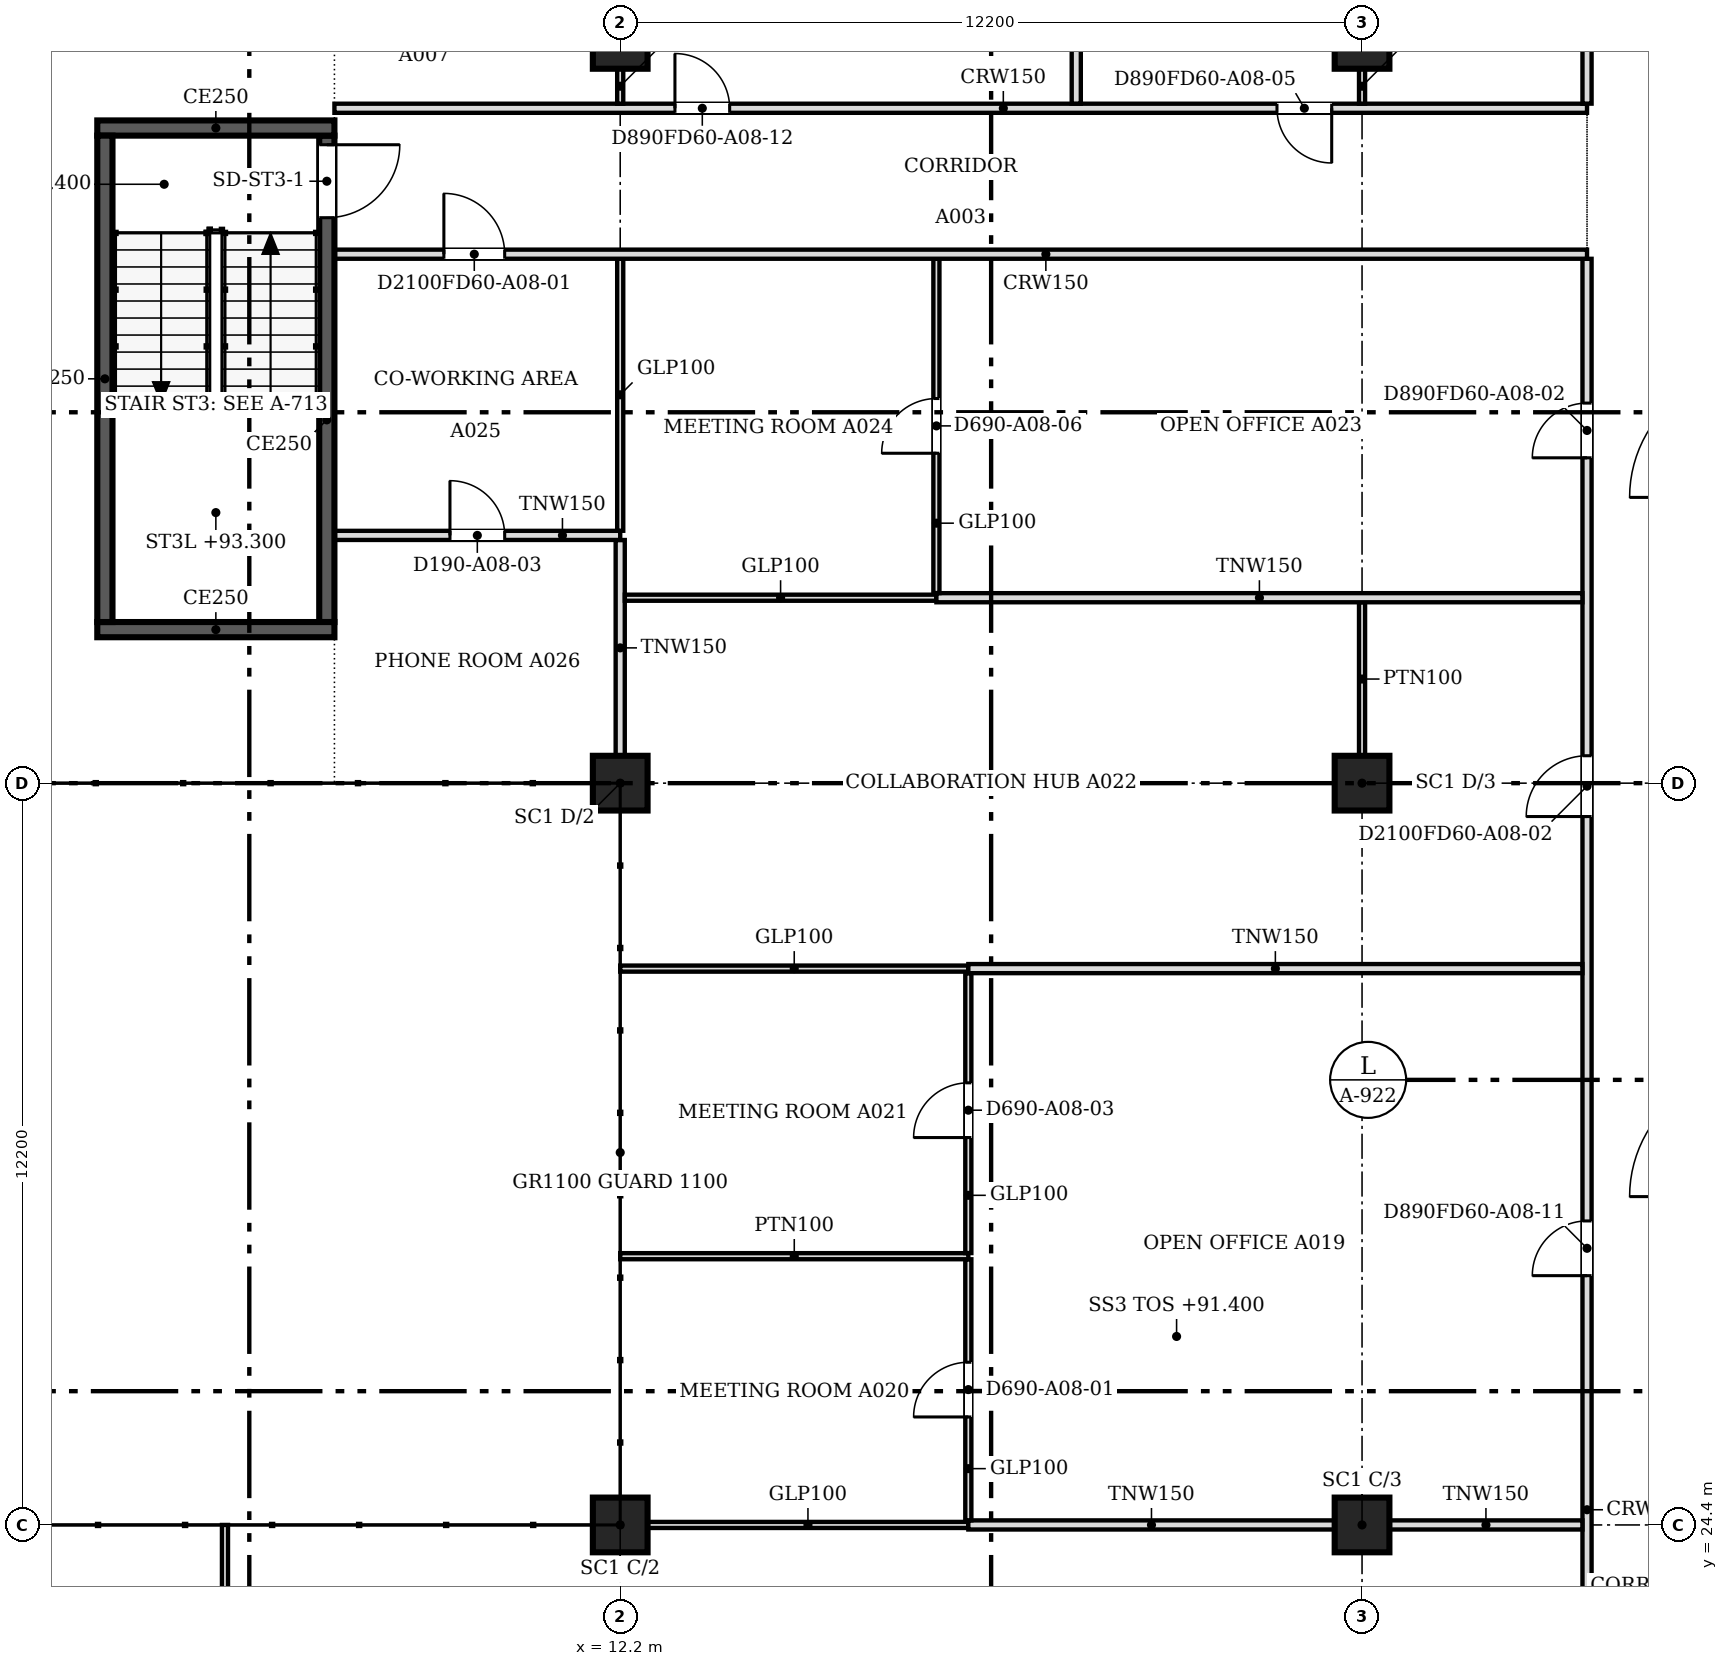
"""IFC4 building model, lengths in metres.
Left out: names, types, materials, properties, quantities, classifications, styles, units other than length and angle.
Written with IfcOpenShell. Run it as: python <this file> out.ifc"""

import sys

from ifc_helpers import new_model, si_unit, direction, frame, frame_2d, origin, origin_2d, place, context, subcontext, project, spatial, rectangle, extrude, source, transform, mapped, element, fill, save


model = new_model("IFC4")
c1 = context("Model", 3, precision=1e-05, world=origin(), true_north=direction((0.0, 1.0)))
c2 = subcontext(c1, "Body", "Model", "MODEL_VIEW")
j1 = project(units=[si_unit("LENGTHUNIT", "METRE"), si_unit("PLANEANGLEUNIT", "RADIAN")], contexts=[c1])
p1 = place(None, origin())
s1 = spatial("IfcSite", under=j1, at=p1, CompositionType="ELEMENT")
p2 = place(p1, origin())
s2 = spatial("IfcBuilding", under=s1, at=p2, CompositionType="ELEMENT")
p3 = place(p2, frame((0.0, 0.0, 91.4)))
s3 = spatial("IfcBuildingStorey", under=s2, at=p3, CompositionType="ELEMENT", Elevation=91.4)
for number, where, z_axis, x_axis in (
    (1, (12.2, 24.4, 0.0), (0.0, 0.0, 1.0), (1.0, 0.0, 0.0)),
    (2, (12.2, 36.6, 0.0), (0.0, 0.0, 1.0), (1.0, 0.0, 0.0)),
    (3, (12.2, 48.8, 0.0), (0.0, 0.0, 1.0), (1.0, 0.0, 0.0)),
    (4, (24.4, 24.4, 0.0), (0.0, 0.0, 1.0), (1.0, 0.0, 0.0)),
    (5, (24.4, 36.6, 0.0), (0.0, 0.0, 1.0), (1.0, 0.0, 0.0)),
    (6, (24.4, 48.8, 0.0), (0.0, 0.0, 1.0), (1.0, 0.0, 0.0)),
):
    element("IfcColumn", number, at=place(p3, frame(where, z_axis=z_axis, x_axis=x_axis)), inside=s3, PredefinedType="COLUMN", context=c2, shape_type="SweptSolid", body=[
        extrude(rectangle(XDim=0.9, YDim=0.9, at=origin_2d()), origin(), (0.0, 0.0, 1.0), 3.6),
    ])
p4 = place(p3, frame((7.5, 39.125, 0.0), z_axis=(0.0, 0.0, 1.0), x_axis=(-1.0, 0.0, 0.0)))
e7 = element("IfcWall", 7, at=p4, inside=s3, PredefinedType="SOLIDWALL", context=c2, shape_type="SweptSolid", body=[
    extrude(rectangle(XDim=3.9, YDim=0.25, at=frame_2d((1.95, 0.0))), origin(), (0.0, 0.0, 1.0), 3.8),
])
p5 = place(p3, frame((3.725, 39.25, 0.0), z_axis=(0.0, 0.0, 1.0), x_axis=(0.0, 1.0, 0.0)))
e8 = element("IfcWall", 8, at=p5, inside=s3, PredefinedType="SOLIDWALL", context=c2, shape_type="SweptSolid", body=[
    extrude(rectangle(XDim=8.0, YDim=0.25, at=frame_2d((4.0, 0.0))), origin(), (0.0, 0.0, 1.0), 3.8),
])
p6 = place(p3, frame((3.6, 47.375, 0.0), z_axis=(0.0, 0.0, 1.0), x_axis=(1.0, 0.0, 0.0)))
e9 = element("IfcWall", 9, at=p6, inside=s3, PredefinedType="SOLIDWALL", context=c2, shape_type="SweptSolid", body=[
    extrude(rectangle(XDim=3.9, YDim=0.25, at=frame_2d((1.95, 0.0))), origin(), (0.0, 0.0, 1.0), 3.8),
])
p7 = place(p3, frame((7.375, 47.25, 0.0), z_axis=(0.0, 0.0, 1.0), x_axis=(0.0, -1.0, 0.0)))
e10 = element("IfcWall", 10, at=p7, inside=s3, PredefinedType="SOLIDWALL", context=c2, shape_type="SweptSolid", body=[
    extrude(rectangle(XDim=8.0, YDim=0.25, at=frame_2d((4.0, 0.0))), origin(), (0.0, 0.0, 1.0), 3.8),
])
m1 = source(origin(), c2, "Body", "SweptSolid", [
    extrude(rectangle(XDim=1.2, YDim=2.1, at=frame_2d((0.6, 1.05))), frame((0.0, 0.135, 0.0), z_axis=(0.0, -1.0, 0.0), x_axis=(1.0, 0.0, 0.0)), (0.0, 0.0, 1.0), 0.27),
])
p8 = place(p7, frame((0.15, 0.0, 0.0)))
e11 = element("IfcOpeningElement", 11, at=p8, cuts=e10, PredefinedType="OPENING", context=c2, shape_type="MappedRepresentation", body=[
    mapped(m1, transform((0.0, 0.0, 0.0), scale=1.0)),
])
p9 = place(p3, frame((28.1, 18.8, 0.0), z_axis=(0.0, 0.0, 1.0), x_axis=(0.0, 1.0, 0.0)))
e12 = element("IfcWall", 12, at=p9, inside=s3, PredefinedType="PARTITIONING", context=c2, shape_type="SweptSolid", body=[
    extrude(rectangle(XDim=26.424, YDim=0.15, at=frame_2d((13.212, 0.0))), origin(), (0.0, 0.0, 1.0), 2.895),
])
m2 = source(origin(), c2, "Body", "SweptSolid", [
    extrude(rectangle(XDim=0.9, YDim=2.1, at=frame_2d((0.45, 1.05))), frame((0.0, 0.085, 0.0), z_axis=(0.0, -1.0, 0.0), x_axis=(1.0, 0.0, 0.0)), (0.0, 0.0, 1.0), 0.17),
])
p10 = place(p9, frame((1.1, 0.0, 0.0)))
e13 = element("IfcOpeningElement", 13, at=p10, cuts=e12, PredefinedType="OPENING", context=c2, shape_type="MappedRepresentation", body=[
    mapped(m2, transform((0.0, 0.0, 0.0), scale=1.0)),
])
p11 = place(p9, frame((23.151, 0.0, 0.0)))
e14 = element("IfcOpeningElement", 14, at=p11, cuts=e12, PredefinedType="OPENING", context=c2, shape_type="MappedRepresentation", body=[
    mapped(m2, transform((0.0, 0.0, 0.0), scale=1.0)),
])
m3 = source(origin(), c2, "Body", "SweptSolid", [
    extrude(rectangle(XDim=1.0, YDim=2.1, at=frame_2d((0.5, 1.05))), frame((0.0, 0.085, 0.0), z_axis=(0.0, -1.0, 0.0), x_axis=(1.0, 0.0, 0.0)), (0.0, 0.0, 1.0), 0.17),
])
p12 = place(p9, frame((17.251, 0.0, 0.0)))
e15 = element("IfcOpeningElement", 15, at=p12, cuts=e12, PredefinedType="OPENING", context=c2, shape_type="MappedRepresentation", body=[
    mapped(m3, transform((0.0, 0.0, 0.0), scale=1.0)),
])
p13 = place(p9, frame((9.7, 0.0, 0.0)))
e16 = element("IfcOpeningElement", 16, at=p13, cuts=e12, PredefinedType="OPENING", context=c2, shape_type="MappedRepresentation", body=[
    mapped(m2, transform((0.0, 0.0, 0.0), scale=1.0)),
])
p14 = place(p3, frame((5.7, 18.99, 0.0), z_axis=(0.0, 0.0, 1.0), x_axis=(0.0, 1.0, 0.0)))
e17 = element("IfcWall", 17, at=p14, inside=s3, PredefinedType="PARTITIONING", context=c2, shape_type="SweptSolid", body=[
    extrude(rectangle(XDim=5.41, YDim=0.1, at=frame_2d((2.705, 0.0))), origin(), (0.0, 0.0, 1.0), 2.895),
])
m4 = source(origin(), c2, "Body", "SweptSolid", [
    extrude(rectangle(XDim=0.9, YDim=2.1, at=frame_2d((0.45, 1.05))), frame((0.0, 0.06, 0.0), z_axis=(0.0, -1.0, 0.0), x_axis=(1.0, 0.0, 0.0)), (0.0, 0.0, 1.0), 0.12),
])
p15 = place(p14, frame((2.3, 0.0, 0.0)))
e18 = element("IfcOpeningElement", 18, at=p15, cuts=e17, PredefinedType="OPENING", context=c2, shape_type="MappedRepresentation", body=[
    mapped(m4, transform((0.0, 0.0, 0.0), scale=1.0)),
])
p16 = place(p3, frame((12.651, 24.4, 0.0), z_axis=(0.0, 0.0, 1.0), x_axis=(1.0, 0.0, 0.0)))
e19 = element("IfcWall", 19, at=p16, inside=s3, PredefinedType="PARTITIONING", context=c2, shape_type="SweptSolid", body=[
    extrude(rectangle(XDim=5.273, YDim=0.1, at=frame_2d((2.637, 0.0))), origin(), (0.0, 0.0, 1.0), 2.895),
])
p17 = place(p3, frame((17.925, 24.4, 0.0), z_axis=(0.0, 0.0, 1.0), x_axis=(1.0, 0.0, 0.0)))
e20 = element("IfcWall", 20, at=p17, inside=s3, PredefinedType="PARTITIONING", context=c2, shape_type="SweptSolid", body=[
    extrude(rectangle(XDim=6.024, YDim=0.15, at=frame_2d((3.012, 0.0))), origin(), (0.0, 0.0, 1.0), 2.895),
])
p18 = place(p3, frame((24.851, 24.4, 0.0), z_axis=(0.0, 0.0, 1.0), x_axis=(1.0, 0.0, 0.0)))
e21 = element("IfcWall", 21, at=p18, inside=s3, PredefinedType="PARTITIONING", context=c2, shape_type="SweptSolid", body=[
    extrude(rectangle(XDim=3.173, YDim=0.15, at=frame_2d((1.586, 0.0))), origin(), (0.0, 0.0, 1.0), 2.895),
])
p19 = place(p3, frame((17.925, 24.476, 0.0), z_axis=(0.0, 0.0, 1.0), x_axis=(0.0, 1.0, 0.0)))
e22 = element("IfcWall", 22, at=p19, inside=s3, PredefinedType="PARTITIONING", context=c2, shape_type="SweptSolid", body=[
    extrude(rectangle(XDim=4.293, YDim=0.1, at=frame_2d((2.146, 0.0))), origin(), (0.0, 0.0, 1.0), 2.895),
])
p20 = place(p19, frame((1.7, 0.0, 0.0)))
e23 = element("IfcOpeningElement", 23, at=p20, cuts=e22, PredefinedType="OPENING", context=c2, shape_type="MappedRepresentation", body=[
    mapped(m4, transform((0.0, 0.0, 0.0), scale=1.0)),
])
p21 = place(p3, frame((12.2, 28.82, 0.0), z_axis=(0.0, 0.0, 1.0), x_axis=(1.0, 0.0, 0.0)))
e24 = element("IfcWall", 24, at=p21, inside=s3, PredefinedType="PARTITIONING", context=c2, shape_type="SweptSolid", body=[
    extrude(rectangle(XDim=5.725, YDim=0.1, at=frame_2d((2.863, 0.0))), origin(), (0.0, 0.0, 1.0), 2.895),
])
p22 = place(p3, frame((17.925, 28.871, 0.0), z_axis=(0.0, 0.0, 1.0), x_axis=(0.0, 1.0, 0.0)))
e25 = element("IfcWall", 25, at=p22, inside=s3, PredefinedType="PARTITIONING", context=c2, shape_type="SweptSolid", body=[
    extrude(rectangle(XDim=4.603, YDim=0.1, at=frame_2d((2.301, 0.0))), origin(), (0.0, 0.0, 1.0), 2.895),
])
p23 = place(p22, frame((1.9, 0.0, 0.0)))
e26 = element("IfcOpeningElement", 26, at=p23, cuts=e25, PredefinedType="OPENING", context=c2, shape_type="MappedRepresentation", body=[
    mapped(m4, transform((0.0, 0.0, 0.0), scale=1.0)),
])
p24 = place(p3, frame((12.2, 33.55, 0.0), z_axis=(0.0, 0.0, 1.0), x_axis=(1.0, 0.0, 0.0)))
e27 = element("IfcWall", 27, at=p24, inside=s3, PredefinedType="PARTITIONING", context=c2, shape_type="SweptSolid", body=[
    extrude(rectangle(XDim=5.724, YDim=0.1, at=frame_2d((2.862, 0.0))), origin(), (0.0, 0.0, 1.0), 2.895),
])
p25 = place(p3, frame((17.925, 33.55, 0.0), z_axis=(0.0, 0.0, 1.0), x_axis=(1.0, 0.0, 0.0)))
e28 = element("IfcWall", 28, at=p25, inside=s3, PredefinedType="PARTITIONING", context=c2, shape_type="SweptSolid", body=[
    extrude(rectangle(XDim=10.099, YDim=0.15, at=frame_2d((5.049, 0.0))), origin(), (0.0, 0.0, 1.0), 2.895),
])
p26 = place(p3, frame((12.2, 37.051, 0.0), z_axis=(0.0, 0.0, 1.0), x_axis=(0.0, 1.0, 0.0)))
e29 = element("IfcWall", 29, at=p26, inside=s3, PredefinedType="PARTITIONING", context=c2, shape_type="SweptSolid", body=[
    extrude(rectangle(XDim=3.548, YDim=0.15, at=frame_2d((1.774, 0.0))), origin(), (0.0, 0.0, 1.0), 2.895),
])
p27 = place(p3, frame((24.4, 37.05, 0.0), z_axis=(0.0, 0.0, 1.0), x_axis=(0.0, 1.0, 0.0)))
e30 = element("IfcWall", 30, at=p27, inside=s3, PredefinedType="PARTITIONING", context=c2, shape_type="SweptSolid", body=[
    extrude(rectangle(XDim=2.525, YDim=0.1, at=frame_2d((1.262, 0.0))), origin(), (0.0, 0.0, 1.0), 2.895),
])
p28 = place(p3, frame((12.276, 39.65, 0.0), z_axis=(0.0, 0.0, 1.0), x_axis=(1.0, 0.0, 0.0)))
e31 = element("IfcWall", 31, at=p28, inside=s3, PredefinedType="PARTITIONING", context=c2, shape_type="SweptSolid", body=[
    extrude(rectangle(XDim=5.123, YDim=0.1, at=frame_2d((2.562, 0.0))), origin(), (0.0, 0.0, 1.0), 2.895),
])
p29 = place(p3, frame((17.4, 39.65, 0.0), z_axis=(0.0, 0.0, 1.0), x_axis=(1.0, 0.0, 0.0)))
e32 = element("IfcWall", 32, at=p29, inside=s3, PredefinedType="PARTITIONING", context=c2, shape_type="SweptSolid", body=[
    extrude(rectangle(XDim=10.624, YDim=0.15, at=frame_2d((5.312, 0.0))), origin(), (0.0, 0.0, 1.0), 2.895),
])
p30 = place(p3, frame((17.4, 39.726, 0.0), z_axis=(0.0, 0.0, 1.0), x_axis=(0.0, 1.0, 0.0)))
e33 = element("IfcWall", 33, at=p30, inside=s3, PredefinedType="PARTITIONING", context=c2, shape_type="SweptSolid", body=[
    extrude(rectangle(XDim=5.498, YDim=0.1, at=frame_2d((2.749, 0.0))), origin(), (0.0, 0.0, 1.0), 2.895),
])
p31 = place(p30, frame((2.3, 0.0, 0.0)))
e34 = element("IfcOpeningElement", 34, at=p31, cuts=e33, PredefinedType="OPENING", context=c2, shape_type="MappedRepresentation", body=[
    mapped(m4, transform((0.0, 0.0, 0.0), scale=1.0)),
])
p32 = place(p3, frame((12.2, 40.675, 0.0), z_axis=(0.0, 0.0, 1.0), x_axis=(-1.0, 0.0, 0.0)))
e35 = element("IfcWall", 35, at=p32, inside=s3, PredefinedType="PARTITIONING", context=c2, shape_type="SweptSolid", body=[
    extrude(rectangle(XDim=4.7, YDim=0.15, at=frame_2d((2.35, 0.0))), origin(), (0.0, 0.0, 1.0), 2.895),
])
p33 = place(p32, frame((1.9, 0.0, 0.0)))
e36 = element("IfcOpeningElement", 36, at=p33, cuts=e35, PredefinedType="OPENING", context=c2, shape_type="MappedRepresentation", body=[
    mapped(m2, transform((0.0, 0.0, 0.0), scale=1.0)),
])
p34 = place(p3, frame((12.2, 40.751, 0.0), z_axis=(0.0, 0.0, 1.0), x_axis=(0.0, 1.0, 0.0)))
e37 = element("IfcWall", 37, at=p34, inside=s3, PredefinedType="PARTITIONING", context=c2, shape_type="SweptSolid", body=[
    extrude(rectangle(XDim=4.473, YDim=0.1, at=frame_2d((2.237, 0.0))), origin(), (0.0, 0.0, 1.0), 2.895),
])
p35 = place(p3, frame((28.1, 45.3, 0.0), z_axis=(0.0, 0.0, 1.0), x_axis=(-1.0, 0.0, 0.0)))
e38 = element("IfcWall", 38, at=p35, inside=s3, PredefinedType="PARTITIONING", context=c2, shape_type="SweptSolid", body=[
    extrude(rectangle(XDim=20.6, YDim=0.15, at=frame_2d((10.3, 0.0))), origin(), (0.0, 0.0, 1.0), 2.895),
])
p36 = place(p35, frame((17.8, 0.0, 0.0)))
e39 = element("IfcOpeningElement", 39, at=p36, cuts=e38, PredefinedType="OPENING", context=c2, shape_type="MappedRepresentation", body=[
    mapped(m3, transform((0.0, 0.0, 0.0), scale=1.0)),
])
p37 = place(p3, frame((7.5, 47.7, 0.0), z_axis=(0.0, 0.0, 1.0), x_axis=(1.0, 0.0, 0.0)))
e40 = element("IfcWall", 40, at=p37, inside=s3, PredefinedType="PARTITIONING", context=c2, shape_type="SweptSolid", body=[
    extrude(rectangle(XDim=20.6, YDim=0.15, at=frame_2d((10.3, 0.0))), origin(), (0.0, 0.0, 1.0), 2.895),
])
p38 = place(p37, frame((15.501, 0.0, 0.0)))
e41 = element("IfcOpeningElement", 41, at=p38, cuts=e40, PredefinedType="OPENING", context=c2, shape_type="MappedRepresentation", body=[
    mapped(m2, transform((0.0, 0.0, 0.0), scale=1.0)),
])
p39 = place(p37, frame((5.6, 0.0, 0.0)))
e42 = element("IfcOpeningElement", 42, at=p39, cuts=e40, PredefinedType="OPENING", context=c2, shape_type="MappedRepresentation", body=[
    mapped(m2, transform((0.0, 0.0, 0.0), scale=1.0)),
])
p40 = place(p3, frame((19.7, 47.776, 0.0), z_axis=(0.0, 0.0, 1.0), x_axis=(0.0, 1.0, 0.0)))
e43 = element("IfcWall", 43, at=p40, inside=s3, PredefinedType="PARTITIONING", context=c2, shape_type="SweptSolid", body=[
    extrude(rectangle(XDim=2.874, YDim=0.15, at=frame_2d((1.437, 0.0))), origin(), (0.0, 0.0, 1.0), 2.895),
])
p41 = place(p3, frame((28.1, 47.776, 0.0), z_axis=(0.0, 0.0, 1.0), x_axis=(0.0, 1.0, 0.0)))
e44 = element("IfcWall", 44, at=p41, inside=s3, PredefinedType="PARTITIONING", context=c2, shape_type="SweptSolid", body=[
    extrude(rectangle(XDim=3.324, YDim=0.15, at=frame_2d((1.662, 0.0))), origin(), (0.0, 0.0, 1.0), 2.895),
])
for number, where, z_axis, x_axis in (
    (45, (12.2, 48.35, 0.0), (0.0, 0.0, 1.0), (0.0, -1.0, 0.0)),
    (46, (24.4, 48.35, 0.0), (0.0, 0.0, 1.0), (0.0, -1.0, 0.0)),
):
    element("IfcWall", number, at=place(p3, frame(where, z_axis=z_axis, x_axis=x_axis)), inside=s3, PredefinedType="PARTITIONING", context=c2, shape_type="SweptSolid", body=[
        extrude(rectangle(XDim=0.575, YDim=0.1, at=frame_2d((0.288, 0.0))), origin(), (0.0, 0.0, 1.0), 2.895),
    ])
m5 = source(origin(), c2, "Body", "SweptSolid", [
    extrude(rectangle(XDim=1.2, YDim=2.1, at=frame_2d((0.6, 1.05))), frame((0.0, 0.025, 0.0), z_axis=(0.0, -1.0, 0.0), x_axis=(1.0, 0.0, 0.0)), (0.0, 0.0, 1.0), 0.05),
])
p42 = place(p8, origin())
e47 = element("IfcDoor", 47, at=p42, inside=s3, OperationType="SINGLE_SWING_LEFT", PredefinedType="DOOR", context=c2, shape_type="MappedRepresentation", body=[
    mapped(m5, transform((0.0, 0.0, 0.0), scale=1.0)),
])
fill(e11, e47)
m6 = source(origin(), c2, "Body", "SweptSolid", [
    extrude(rectangle(XDim=0.9, YDim=2.1, at=frame_2d((0.45, 1.05))), frame((0.0, 0.025, 0.0), z_axis=(0.0, -1.0, 0.0), x_axis=(1.0, 0.0, 0.0)), (0.0, 0.0, 1.0), 0.05),
])
p43 = place(p20, origin())
e48 = element("IfcDoor", 48, at=p43, inside=s3, OperationType="SINGLE_SWING_LEFT", PredefinedType="DOOR", context=c2, shape_type="MappedRepresentation", body=[
    mapped(m6, transform((0.0, 0.0, 0.0), scale=1.0)),
])
fill(e23, e48)
p44 = place(p23, origin())
e49 = element("IfcDoor", 49, at=p44, inside=s3, OperationType="SINGLE_SWING_LEFT", PredefinedType="DOOR", context=c2, shape_type="MappedRepresentation", body=[
    mapped(m6, transform((0.0, 0.0, 0.0), scale=1.0)),
])
fill(e26, e49)
m7 = source(origin(), c2, "Body", "SweptSolid", [
    extrude(rectangle(XDim=1.0, YDim=2.1, at=frame_2d((0.5, 1.05))), frame((0.0, 0.025, 0.0), z_axis=(0.0, -1.0, 0.0), x_axis=(1.0, 0.0, 0.0)), (0.0, 0.0, 1.0), 0.05),
])
p45 = place(p36, origin())
e50 = element("IfcDoor", 50, at=p45, inside=s3, OperationType="SINGLE_SWING_RIGHT", PredefinedType="DOOR", context=c2, shape_type="MappedRepresentation", body=[
    mapped(m7, transform((0.0, 0.0, 0.0), scale=1.0)),
])
fill(e39, e50)
p46 = place(p33, origin())
e51 = element("IfcDoor", 51, at=p46, inside=s3, OperationType="SINGLE_SWING_RIGHT", PredefinedType="DOOR", context=c2, shape_type="MappedRepresentation", body=[
    mapped(m6, transform((0.0, 0.0, 0.0), scale=1.0)),
])
fill(e36, e51)
p47 = place(p31, origin())
e52 = element("IfcDoor", 52, at=p47, inside=s3, OperationType="SINGLE_SWING_LEFT", PredefinedType="DOOR", context=c2, shape_type="MappedRepresentation", body=[
    mapped(m6, transform((0.0, 0.0, 0.0), scale=1.0)),
])
fill(e34, e52)
p48 = place(p11, origin())
e53 = element("IfcDoor", 53, at=p48, inside=s3, OperationType="SINGLE_SWING_LEFT", PredefinedType="DOOR", context=c2, shape_type="MappedRepresentation", body=[
    mapped(m6, transform((0.0, 0.0, 0.0), scale=1.0)),
])
fill(e14, e53)
p49 = place(p12, origin())
e54 = element("IfcDoor", 54, at=p49, inside=s3, OperationType="SINGLE_SWING_LEFT", PredefinedType="DOOR", context=c2, shape_type="MappedRepresentation", body=[
    mapped(m7, transform((0.0, 0.0, 0.0), scale=1.0)),
])
fill(e15, e54)
p50 = place(p38, origin())
e55 = element("IfcDoor", 55, at=p50, inside=s3, OperationType="SINGLE_SWING_RIGHT", PredefinedType="DOOR", context=c2, shape_type="MappedRepresentation", body=[
    mapped(m6, transform((0.0, 0.0, 0.0), scale=1.0)),
])
fill(e41, e55)
p51 = place(p13, origin())
e56 = element("IfcDoor", 56, at=p51, inside=s3, OperationType="SINGLE_SWING_LEFT", PredefinedType="DOOR", context=c2, shape_type="MappedRepresentation", body=[
    mapped(m6, transform((0.0, 0.0, 0.0), scale=1.0)),
])
fill(e16, e56)
p52 = place(p39, origin())
e57 = element("IfcDoor", 57, at=p52, inside=s3, OperationType="SINGLE_SWING_LEFT", PredefinedType="DOOR", context=c2, shape_type="MappedRepresentation", body=[
    mapped(m6, transform((0.0, 0.0, 0.0), scale=1.0)),
])
fill(e42, e57)
save(model, sys.argv[1])
